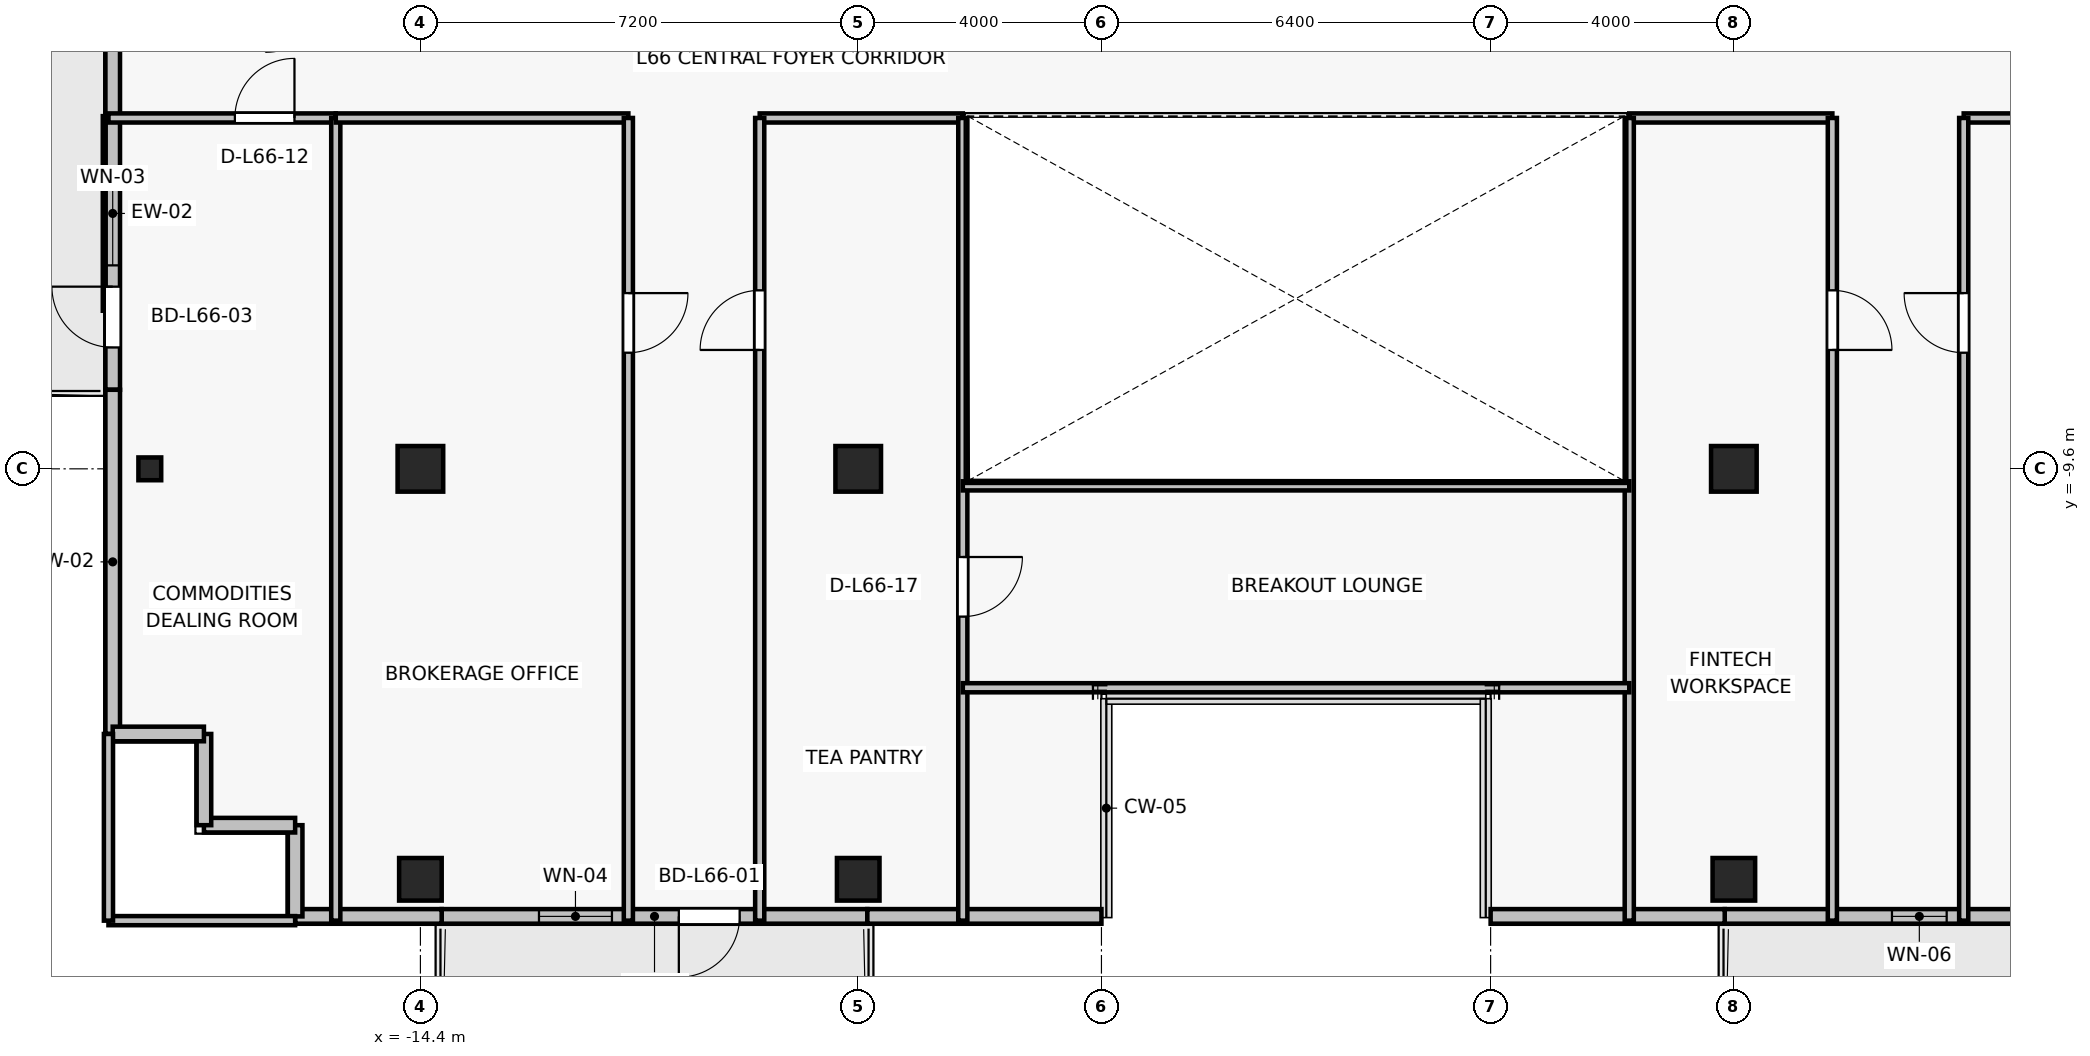
"""IFC4 building model, lengths in metres.
Left out: names, types, materials, properties, quantities, classifications, styles, units other than length and angle.
Written with IfcOpenShell. Run it as: python <this file> out.ifc"""

import sys

from ifc_helpers import new_model, si_unit, direction, frame, frame_2d, origin, origin_2d, place, context, subcontext, project, spatial, rectangle, i_section, extrude, source, transform, mapped, element, fill, save


model = new_model("IFC4")
c1 = context("Model", 3, precision=1e-05, world=origin(), true_north=direction((0.0, 1.0)))
c2 = subcontext(c1, "Body", "Model", "MODEL_VIEW")
j1 = project(units=[si_unit("LENGTHUNIT", "METRE"), si_unit("PLANEANGLEUNIT", "RADIAN")], contexts=[c1])
p1 = place(None, origin())
s1 = spatial("IfcSite", under=j1, at=p1, CompositionType="ELEMENT")
p2 = place(p1, origin())
s2 = spatial("IfcBuilding", under=s1, at=p2, CompositionType="ELEMENT")
p3 = place(p2, frame((0.0, 0.0, 235.3)))
s3 = spatial("IfcBuildingStorey", under=s2, at=p3, CompositionType="ELEMENT", Elevation=235.3)
for number, where, z_axis, x_axis in (
    (1, (-14.4, -9.6, 0.0), (0.0, 0.0, 1.0), (1.0, 0.0, 0.0)),
    (2, (-7.2, -9.6, 0.0), (0.0, 0.0, 1.0), (1.0, 0.0, 0.0)),
    (3, (7.2, -9.6, 0.0), (0.0, 0.0, 1.0), (1.0, 0.0, 0.0)),
):
    element("IfcColumn", number, at=place(p3, frame(where, z_axis=z_axis, x_axis=x_axis)), inside=s3, PredefinedType="COLUMN", context=c2, shape_type="SweptSolid", body=[
        extrude(rectangle(XDim=0.75, YDim=0.75, at=origin_2d()), origin(), (0.0, 0.0, 1.0), 3.3),
    ])
for number, where, z_axis, x_axis in (
    (4, (-14.4, -16.35, 0.0), (0.0, 0.0, 1.0), (1.0, 0.0, 0.0)),
    (5, (-7.2, -16.35, 0.0), (0.0, 0.0, 1.0), (1.0, 0.0, 0.0)),
    (6, (7.2, -16.35, 0.0), (0.0, 0.0, 1.0), (1.0, 0.0, 0.0)),
):
    element("IfcColumn", number, at=place(p3, frame(where, z_axis=z_axis, x_axis=x_axis)), inside=s3, PredefinedType="COLUMN", context=c2, shape_type="SweptSolid", body=[
        extrude(rectangle(XDim=0.7, YDim=0.7, at=origin_2d()), origin(), (0.0, 0.0, 1.0), 3.3),
    ])
p4 = place(p3, frame((-18.85, -9.6, 0.0), z_axis=(0.0, 0.0, 1.0), x_axis=(1.0, 0.0, 0.0)))
e7 = element("IfcColumn", 7, at=p4, inside=s3, PredefinedType="COLUMN", context=c2, shape_type="SweptSolid", body=[
    extrude(i_section(OverallWidth=0.375, OverallDepth=0.375, WebThickness=0.017, FlangeThickness=0.027, FilletRadius=0.015, at=origin_2d()), origin(), (0.0, 0.0, 1.0), 3.3),
])
p5 = place(p3, frame((-7.05, -16.96, 0.0), z_axis=(0.0, 0.0, 1.0), x_axis=(-1.0, 0.0, 0.0)))
e8 = element("IfcWall", 8, at=p5, inside=s3, PredefinedType="SOLIDWALL", context=c2, shape_type="SweptSolid", body=[
    extrude(rectangle(XDim=7.0, YDim=0.24, at=frame_2d((3.5, 0.0))), origin(), (0.0, 0.0, 1.0), 2.665),
])
p6 = place(p5, frame((2.1, 0.0, 0.0)))
e9 = element("IfcOpeningElement", 9, at=p6, cuts=e8, PredefinedType="OPENING", context=c2, shape_type="SweptSolid", body=[
    extrude(rectangle(XDim=1.0, YDim=2.2, at=frame_2d((0.5, 1.1))), frame((0.0, 0.13, 0.0), z_axis=(0.0, -1.0, 0.0), x_axis=(1.0, 0.0, 0.0)), (0.0, 0.0, 1.0), 0.26),
])
p7 = place(p5, frame((4.2, 0.0, 0.85)))
e10 = element("IfcOpeningElement", 10, at=p7, cuts=e8, PredefinedType="OPENING", context=c2, shape_type="SweptSolid", body=[
    extrude(rectangle(XDim=1.2, YDim=1.5, at=frame_2d((0.6, 0.75))), frame((0.0, 0.13, 0.0), z_axis=(0.0, -1.0, 0.0), x_axis=(1.0, 0.0, 0.0)), (0.0, 0.0, 1.0), 0.26),
])
p8 = place(p3, frame((14.05, -16.96, 0.0), z_axis=(0.0, 0.0, 1.0), x_axis=(-1.0, 0.0, 0.0)))
e11 = element("IfcWall", 11, at=p8, inside=s3, PredefinedType="SOLIDWALL", context=c2, shape_type="SweptSolid", body=[
    extrude(rectangle(XDim=7.0, YDim=0.24, at=frame_2d((3.5, 0.0))), origin(), (0.0, 0.0, 1.0), 2.665),
])
p9 = place(p8, frame((0.84, 0.0, 0.0)))
e12 = element("IfcOpeningElement", 12, at=p9, cuts=e11, PredefinedType="OPENING", context=c2, shape_type="SweptSolid", body=[
    extrude(rectangle(XDim=1.0, YDim=2.2, at=frame_2d((0.5, 1.1))), frame((0.0, 0.13, 0.0), z_axis=(0.0, -1.0, 0.0), x_axis=(1.0, 0.0, 0.0)), (0.0, 0.0, 1.0), 0.26),
])
p10 = place(p8, frame((3.35, 0.0, 0.85)))
e13 = element("IfcOpeningElement", 13, at=p10, cuts=e11, PredefinedType="OPENING", context=c2, shape_type="SweptSolid", body=[
    extrude(rectangle(XDim=0.9, YDim=1.35, at=frame_2d((0.45, 0.675))), frame((0.0, 0.13, 0.0), z_axis=(0.0, -1.0, 0.0), x_axis=(1.0, 0.0, 0.0)), (0.0, 0.0, 1.0), 0.26),
])
p11 = place(p3, frame((-19.46, -8.3, 0.0), z_axis=(0.0, 0.0, 1.0), x_axis=(0.0, 1.0, 0.0)))
e14 = element("IfcWall", 14, at=p11, inside=s3, PredefinedType="SOLIDWALL", context=c2, shape_type="SweptSolid", body=[
    extrude(rectangle(XDim=5.8, YDim=0.24, at=frame_2d((2.9, 0.0))), origin(), (0.0, 0.0, 1.0), 3.075),
])
p12 = place(p11, frame((0.696, 0.0, 0.0)))
e15 = element("IfcOpeningElement", 15, at=p12, cuts=e14, PredefinedType="OPENING", context=c2, shape_type="SweptSolid", body=[
    extrude(rectangle(XDim=1.0, YDim=2.2, at=frame_2d((0.5, 1.1))), frame((0.0, 0.13, 0.0), z_axis=(0.0, -1.0, 0.0), x_axis=(1.0, 0.0, 0.0)), (0.0, 0.0, 1.0), 0.26),
])
p13 = place(p11, frame((2.046, 0.0, 0.85)))
e16 = element("IfcOpeningElement", 16, at=p13, cuts=e14, PredefinedType="OPENING", context=c2, shape_type="SweptSolid", body=[
    extrude(rectangle(XDim=1.5, YDim=1.6, at=frame_2d((0.75, 0.8))), frame((0.0, 0.13, 0.0), z_axis=(0.0, -1.0, 0.0), x_axis=(1.0, 0.0, 0.0)), (0.0, 0.0, 1.0), 0.26),
])
p14 = place(p3, frame((-19.46, -8.3, 0.0), z_axis=(0.0, 0.0, 1.0), x_axis=(0.0, -1.0, 0.0)))
e17 = element("IfcWall", 17, at=p14, inside=s3, PredefinedType="SOLIDWALL", context=c2, shape_type="SweptSolid", body=[
    extrude(rectangle(XDim=5.66, YDim=0.24, at=frame_2d((2.83, 0.0))), origin(), (0.0, 0.0, 1.0), 3.075),
])
for number, where, z_axis, x_axis in (
    (18, (3.2, -16.96, 0.0), (0.0, 0.0, 1.0), (1.0, 0.0, 0.0)),
    (19, (-7.05, -16.96, 0.0), (0.0, 0.0, 1.0), (1.0, 0.0, 0.0)),
):
    element("IfcWall", number, at=place(p3, frame(where, z_axis=z_axis, x_axis=x_axis)), inside=s3, PredefinedType="SOLIDWALL", context=c2, shape_type="SweptSolid", body=[
        extrude(rectangle(XDim=3.85, YDim=0.24, at=frame_2d((1.925, 0.0))), origin(), (0.0, 0.0, 1.0), 3.075),
    ])
p15 = place(p3, frame((-16.46, -16.96, 0.0), z_axis=(0.0, 0.0, 1.0), x_axis=(1.0, 0.0, 0.0)))
e20 = element("IfcWall", 20, at=p15, inside=s3, PredefinedType="SOLIDWALL", context=c2, shape_type="SweptSolid", body=[
    extrude(rectangle(XDim=2.41, YDim=0.24, at=frame_2d((1.205, 0.0))), origin(), (0.0, 0.0, 1.0), 3.075),
])
for number, where, z_axis, x_axis in (
    (21, (-16.46, -15.46, 0.0), (0.0, 0.0, 1.0), (0.0, -1.0, 0.0)),
    (22, (-17.96, -15.46, 0.0), (0.0, 0.0, 1.0), (1.0, 0.0, 0.0)),
    (23, (-17.96, -13.96, 0.0), (0.0, 0.0, 1.0), (0.0, -1.0, 0.0)),
    (24, (-19.46, -13.96, 0.0), (0.0, 0.0, 1.0), (1.0, 0.0, 0.0)),
):
    element("IfcWall", number, at=place(p3, frame(where, z_axis=z_axis, x_axis=x_axis)), inside=s3, PredefinedType="SOLIDWALL", context=c2, shape_type="SweptSolid", body=[
        extrude(rectangle(XDim=1.5, YDim=0.24, at=frame_2d((0.75, 0.0))), origin(), (0.0, 0.0, 1.0), 3.075),
    ])
p16 = place(p3, frame((-16.46, -17.03, 0.0), z_axis=(0.0, 0.0, 1.0), x_axis=(-1.0, 0.0, 0.0)))
e25 = element("IfcWall", 25, at=p16, inside=s3, PredefinedType="PARTITIONING", context=c2, shape_type="SweptSolid", body=[
    extrude(rectangle(XDim=3.07, YDim=0.15, at=frame_2d((1.535, 0.0))), origin(), (0.0, 0.0, 1.0), 3.075),
])
p17 = place(p3, frame((-19.53, -3.83, 0.0), z_axis=(0.0, 0.0, 1.0), x_axis=(1.0, 0.0, 0.0)))
e26 = element("IfcWall", 26, at=p17, inside=s3, PredefinedType="PARTITIONING", context=c2, shape_type="SweptSolid", body=[
    extrude(rectangle(XDim=3.738, YDim=0.15, at=frame_2d((1.869, 0.0))), origin(), (0.0, 0.0, 1.0), 2.765),
])
p18 = place(p17, frame((2.079, 0.0, 0.0)))
e27 = element("IfcOpeningElement", 27, at=p18, cuts=e26, PredefinedType="OPENING", context=c2, shape_type="SweptSolid", body=[
    extrude(rectangle(XDim=0.98, YDim=2.15, at=frame_2d((0.49, 1.075))), frame((0.0, 0.085, 0.0), z_axis=(0.0, -1.0, 0.0), x_axis=(1.0, 0.0, 0.0)), (0.0, 0.0, 1.0), 0.17),
])
p19 = place(p3, frame((-19.53, -17.03, 0.0), z_axis=(0.0, 0.0, 1.0), x_axis=(0.0, 1.0, 0.0)))
e28 = element("IfcWall", 28, at=p19, inside=s3, PredefinedType="PARTITIONING", context=c2, shape_type="SweptSolid", body=[
    extrude(rectangle(XDim=3.07, YDim=0.15, at=frame_2d((1.535, 0.0))), origin(), (0.0, 0.0, 1.0), 3.075),
])
p20 = place(p3, frame((-15.792, -3.83, 0.0), z_axis=(0.0, 0.0, 1.0), x_axis=(0.0, -1.0, 0.0)))
e29 = element("IfcWall", 29, at=p20, inside=s3, PredefinedType="PARTITIONING", context=c2, shape_type="SweptSolid", body=[
    extrude(rectangle(XDim=13.2, YDim=0.15, at=frame_2d((6.6, 0.0))), origin(), (0.0, 0.0, 1.0), 2.615),
])
p21 = place(p3, frame((-15.792, -3.83, 0.0), z_axis=(0.0, 0.0, 1.0), x_axis=(1.0, 0.0, 0.0)))
e30 = element("IfcWall", 30, at=p21, inside=s3, PredefinedType="PARTITIONING", context=c2, shape_type="SweptSolid", body=[
    extrude(rectangle(XDim=4.812, YDim=0.15, at=frame_2d((2.406, 0.0))), origin(), (0.0, 0.0, 1.0), 2.615),
])
p22 = place(p3, frame((-10.98, -3.83, 0.0), z_axis=(0.0, 0.0, 1.0), x_axis=(0.0, -1.0, 0.0)))
e31 = element("IfcWall", 31, at=p22, inside=s3, PredefinedType="PARTITIONING", context=c2, shape_type="SweptSolid", body=[
    extrude(rectangle(XDim=13.2, YDim=0.15, at=frame_2d((6.6, 0.0))), origin(), (0.0, 0.0, 1.0), 2.615),
])
p23 = place(p22, frame((2.88, 0.0, 0.0)))
e32 = element("IfcOpeningElement", 32, at=p23, cuts=e31, PredefinedType="OPENING", context=c2, shape_type="SweptSolid", body=[
    extrude(rectangle(XDim=0.98, YDim=2.15, at=frame_2d((0.49, 1.075))), frame((0.0, 0.085, 0.0), z_axis=(0.0, -1.0, 0.0), x_axis=(1.0, 0.0, 0.0)), (0.0, 0.0, 1.0), 0.17),
])
p24 = place(p3, frame((10.98, -3.83, 0.0), z_axis=(0.0, 0.0, 1.0), x_axis=(1.0, 0.0, 0.0)))
e33 = element("IfcWall", 33, at=p24, inside=s3, PredefinedType="PARTITIONING", context=c2, shape_type="SweptSolid", body=[
    extrude(rectangle(XDim=12.55, YDim=0.15, at=frame_2d((6.275, 0.0))), origin(), (0.0, 0.0, 1.0), 2.615),
])
p25 = place(p3, frame((10.98, -17.03, 0.0), z_axis=(0.0, 0.0, 1.0), x_axis=(0.0, 1.0, 0.0)))
e34 = element("IfcWall", 34, at=p25, inside=s3, PredefinedType="PARTITIONING", context=c2, shape_type="SweptSolid", body=[
    extrude(rectangle(XDim=13.2, YDim=0.15, at=frame_2d((6.6, 0.0))), origin(), (0.0, 0.0, 1.0), 2.615),
])
p26 = place(p25, frame((9.34, 0.0, 0.0)))
e35 = element("IfcOpeningElement", 35, at=p26, cuts=e34, PredefinedType="OPENING", context=c2, shape_type="SweptSolid", body=[
    extrude(rectangle(XDim=0.98, YDim=2.15, at=frame_2d((0.49, 1.075))), frame((0.0, 0.085, 0.0), z_axis=(0.0, -1.0, 0.0), x_axis=(1.0, 0.0, 0.0)), (0.0, 0.0, 1.0), 0.17),
])
p27 = place(p3, frame((-8.82, -3.83, 0.0), z_axis=(0.0, 0.0, 1.0), x_axis=(1.0, 0.0, 0.0)))
e36 = element("IfcWall", 36, at=p27, inside=s3, PredefinedType="PARTITIONING", context=c2, shape_type="SweptSolid", body=[
    extrude(rectangle(XDim=3.34, YDim=0.15, at=frame_2d((1.67, 0.0))), origin(), (0.0, 0.0, 1.0), 2.615),
])
p28 = place(p3, frame((-8.82, -17.03, 0.0), z_axis=(0.0, 0.0, 1.0), x_axis=(0.0, 1.0, 0.0)))
e37 = element("IfcWall", 37, at=p28, inside=s3, PredefinedType="PARTITIONING", context=c2, shape_type="SweptSolid", body=[
    extrude(rectangle(XDim=13.2, YDim=0.15, at=frame_2d((6.6, 0.0))), origin(), (0.0, 0.0, 1.0), 2.615),
])
p29 = place(p28, frame((9.385, 0.0, 0.0)))
e38 = element("IfcOpeningElement", 38, at=p29, cuts=e37, PredefinedType="OPENING", context=c2, shape_type="SweptSolid", body=[
    extrude(rectangle(XDim=0.98, YDim=2.15, at=frame_2d((0.49, 1.075))), frame((0.0, 0.085, 0.0), z_axis=(0.0, -1.0, 0.0), x_axis=(1.0, 0.0, 0.0)), (0.0, 0.0, 1.0), 0.17),
])
p30 = place(p3, frame((-5.48, -3.83, 0.0), z_axis=(0.0, 0.0, 1.0), x_axis=(0.0, -1.0, 0.0)))
e39 = element("IfcWall", 39, at=p30, inside=s3, PredefinedType="PARTITIONING", context=c2, shape_type="SweptSolid", body=[
    extrude(rectangle(XDim=13.2, YDim=0.15, at=frame_2d((6.6, 0.0))), origin(), (0.0, 0.0, 1.0), 2.615),
])
p31 = place(p30, frame((7.22, 0.0, 0.0)))
e40 = element("IfcOpeningElement", 40, at=p31, cuts=e39, PredefinedType="OPENING", context=c2, shape_type="SweptSolid", body=[
    extrude(rectangle(XDim=0.98, YDim=2.15, at=frame_2d((0.49, 1.075))), frame((0.0, 0.085, 0.0), z_axis=(0.0, -1.0, 0.0), x_axis=(1.0, 0.0, 0.0)), (0.0, 0.0, 1.0), 0.17),
])
p32 = place(p3, frame((5.48, -3.83, 0.0), z_axis=(0.0, 0.0, 1.0), x_axis=(1.0, 0.0, 0.0)))
e41 = element("IfcWall", 41, at=p32, inside=s3, PredefinedType="PARTITIONING", context=c2, shape_type="SweptSolid", body=[
    extrude(rectangle(XDim=3.34, YDim=0.15, at=frame_2d((1.67, 0.0))), origin(), (0.0, 0.0, 1.0), 2.615),
])
p33 = place(p3, frame((5.48, -17.03, 0.0), z_axis=(0.0, 0.0, 1.0), x_axis=(0.0, 1.0, 0.0)))
e42 = element("IfcWall", 42, at=p33, inside=s3, PredefinedType="PARTITIONING", context=c2, shape_type="SweptSolid", body=[
    extrude(rectangle(XDim=13.2, YDim=0.15, at=frame_2d((6.6, 0.0))), origin(), (0.0, 0.0, 1.0), 2.615),
])
p34 = place(p3, frame((8.82, -3.83, 0.0), z_axis=(0.0, 0.0, 1.0), x_axis=(0.0, -1.0, 0.0)))
e43 = element("IfcWall", 43, at=p34, inside=s3, PredefinedType="PARTITIONING", context=c2, shape_type="SweptSolid", body=[
    extrude(rectangle(XDim=13.2, YDim=0.15, at=frame_2d((6.6, 0.0))), origin(), (0.0, 0.0, 1.0), 2.615),
])
p35 = place(p34, frame((2.835, 0.0, 0.0)))
e44 = element("IfcOpeningElement", 44, at=p35, cuts=e43, PredefinedType="OPENING", context=c2, shape_type="SweptSolid", body=[
    extrude(rectangle(XDim=0.98, YDim=2.15, at=frame_2d((0.49, 1.075))), frame((0.0, 0.085, 0.0), z_axis=(0.0, -1.0, 0.0), x_axis=(1.0, 0.0, 0.0)), (0.0, 0.0, 1.0), 0.17),
])
p36 = place(p3, frame((5.48, -13.2, 0.0), z_axis=(0.0, 0.0, 1.0), x_axis=(-1.0, 0.0, 0.0)))
e45 = element("IfcWall", 45, at=p36, inside=s3, PredefinedType="PARTITIONING", context=c2, shape_type="SweptSolid", body=[
    extrude(rectangle(XDim=10.96, YDim=0.15, at=frame_2d((5.48, 0.0))), origin(), (0.0, 0.0, 1.0), 2.765),
])
p37 = place(p3, frame((-5.48, -9.88, 0.0), z_axis=(0.0, 0.0, 1.0), x_axis=(1.0, 0.0, 0.0)))
e46 = element("IfcWall", 46, at=p37, inside=s3, PredefinedType="PARTITIONING", context=c2, shape_type="SweptSolid", body=[
    extrude(rectangle(XDim=10.96, YDim=0.15, at=frame_2d((5.48, 0.0))), origin(), (0.0, 0.0, 1.0), 2.615),
])
m1 = source(origin(), c2, "Body", "SweptSolid", [
    extrude(rectangle(XDim=1.0, YDim=2.2, at=frame_2d((0.5, 1.1))), frame((0.0, 0.025, 0.0), z_axis=(0.0, -1.0, 0.0), x_axis=(1.0, 0.0, 0.0)), (0.0, 0.0, 1.0), 0.05),
])
p38 = place(p6, origin())
e47 = element("IfcDoor", 47, at=p38, inside=s3, OperationType="SINGLE_SWING_RIGHT", PredefinedType="DOOR", context=c2, shape_type="MappedRepresentation", body=[
    mapped(m1, transform((0.0, 0.0, 0.0), x_axis=(1.0, 0.0, 0.0), y_axis=(0.0, 1.0, 0.0), z_axis=(0.0, 0.0, 1.0), scale=1.0)),
])
fill(e9, e47)
m2 = source(origin(), c2, "Body", "SweptSolid", [
    extrude(rectangle(XDim=1.2, YDim=1.5, at=frame_2d((0.6, 0.75))), frame((0.0, 0.03, 0.0), z_axis=(0.0, -1.0, 0.0), x_axis=(1.0, 0.0, 0.0)), (0.0, 0.0, 1.0), 0.06),
])
p39 = place(p7, origin())
e48 = element("IfcWindow", 48, at=p39, inside=s3, PartitioningType="SINGLE_PANEL", PredefinedType="WINDOW", context=c2, shape_type="MappedRepresentation", body=[
    mapped(m2, transform((0.0, 0.0, 0.0), x_axis=(1.0, 0.0, 0.0), y_axis=(0.0, 1.0, 0.0), z_axis=(0.0, 0.0, 1.0), scale=1.0)),
])
fill(e10, e48)
m3 = source(origin(), c2, "Body", "SweptSolid", [
    extrude(rectangle(XDim=0.9, YDim=1.35, at=frame_2d((0.45, 0.675))), frame((0.0, 0.03, 0.0), z_axis=(0.0, -1.0, 0.0), x_axis=(1.0, 0.0, 0.0)), (0.0, 0.0, 1.0), 0.06),
])
p40 = place(p10, origin())
e49 = element("IfcWindow", 49, at=p40, inside=s3, PartitioningType="SINGLE_PANEL", PredefinedType="WINDOW", context=c2, shape_type="MappedRepresentation", body=[
    mapped(m3, transform((0.0, 0.0, 0.0), x_axis=(1.0, 0.0, 0.0), y_axis=(0.0, 1.0, 0.0), z_axis=(0.0, 0.0, 1.0), scale=1.0)),
])
fill(e13, e49)
p41 = place(p12, origin())
e50 = element("IfcDoor", 50, at=p41, inside=s3, OperationType="SINGLE_SWING_RIGHT", PredefinedType="DOOR", context=c2, shape_type="MappedRepresentation", body=[
    mapped(m1, transform((0.0, 0.0, 0.0), x_axis=(1.0, 0.0, 0.0), y_axis=(0.0, 1.0, 0.0), z_axis=(0.0, 0.0, 1.0), scale=1.0)),
])
fill(e15, e50)
m4 = source(origin(), c2, "Body", "SweptSolid", [
    extrude(rectangle(XDim=1.5, YDim=1.6, at=frame_2d((0.75, 0.8))), frame((0.0, 0.03, 0.0), z_axis=(0.0, -1.0, 0.0), x_axis=(1.0, 0.0, 0.0)), (0.0, 0.0, 1.0), 0.06),
])
p42 = place(p13, origin())
e51 = element("IfcWindow", 51, at=p42, inside=s3, PartitioningType="SINGLE_PANEL", PredefinedType="WINDOW", context=c2, shape_type="MappedRepresentation", body=[
    mapped(m4, transform((0.0, 0.0, 0.0), x_axis=(1.0, 0.0, 0.0), y_axis=(0.0, 1.0, 0.0), z_axis=(0.0, 0.0, 1.0), scale=1.0)),
])
fill(e16, e51)
m5 = source(origin(), c2, "Body", "SweptSolid", [
    extrude(rectangle(XDim=0.98, YDim=2.15, at=frame_2d((0.49, 1.075))), frame((0.0, 0.025, 0.0), z_axis=(0.0, -1.0, 0.0), x_axis=(1.0, 0.0, 0.0)), (0.0, 0.0, 1.0), 0.05),
])
p43 = place(p18, origin())
e52 = element("IfcDoor", 52, at=p43, inside=s3, OperationType="SINGLE_SWING_RIGHT", PredefinedType="DOOR", context=c2, shape_type="MappedRepresentation", body=[
    mapped(m5, transform((0.0, 0.0, 0.0), x_axis=(1.0, 0.0, 0.0), y_axis=(0.0, 1.0, 0.0), z_axis=(0.0, 0.0, 1.0), scale=1.0)),
])
fill(e27, e52)
p44 = place(p23, origin())
e53 = element("IfcDoor", 53, at=p44, inside=s3, OperationType="SINGLE_SWING_LEFT", PredefinedType="DOOR", context=c2, shape_type="MappedRepresentation", body=[
    mapped(m5, transform((0.0, 0.0, 0.0), x_axis=(1.0, 0.0, 0.0), y_axis=(0.0, 1.0, 0.0), z_axis=(0.0, 0.0, 1.0), scale=1.0)),
])
fill(e32, e53)
p45 = place(p26, origin())
e54 = element("IfcDoor", 54, at=p45, inside=s3, OperationType="SINGLE_SWING_RIGHT", PredefinedType="DOOR", context=c2, shape_type="MappedRepresentation", body=[
    mapped(m5, transform((0.0, 0.0, 0.0), x_axis=(1.0, 0.0, 0.0), y_axis=(0.0, 1.0, 0.0), z_axis=(0.0, 0.0, 1.0), scale=1.0)),
])
fill(e35, e54)
p46 = place(p29, origin())
e55 = element("IfcDoor", 55, at=p46, inside=s3, OperationType="SINGLE_SWING_LEFT", PredefinedType="DOOR", context=c2, shape_type="MappedRepresentation", body=[
    mapped(m5, transform((0.0, 0.0, 0.0), x_axis=(1.0, 0.0, 0.0), y_axis=(0.0, 1.0, 0.0), z_axis=(0.0, 0.0, 1.0), scale=1.0)),
])
fill(e38, e55)
p47 = place(p35, origin())
e56 = element("IfcDoor", 56, at=p47, inside=s3, OperationType="SINGLE_SWING_RIGHT", PredefinedType="DOOR", context=c2, shape_type="MappedRepresentation", body=[
    mapped(m5, transform((0.0, 0.0, 0.0), x_axis=(1.0, 0.0, 0.0), y_axis=(0.0, 1.0, 0.0), z_axis=(0.0, 0.0, 1.0), scale=1.0)),
])
fill(e44, e56)
p48 = place(p31, origin())
e57 = element("IfcDoor", 57, at=p48, inside=s3, OperationType="SINGLE_SWING_LEFT", PredefinedType="DOOR", context=c2, shape_type="MappedRepresentation", body=[
    mapped(m5, transform((0.0, 0.0, 0.0), x_axis=(1.0, 0.0, 0.0), y_axis=(0.0, 1.0, 0.0), z_axis=(0.0, 0.0, 1.0), scale=1.0)),
])
fill(e40, e57)
save(model, sys.argv[1])
